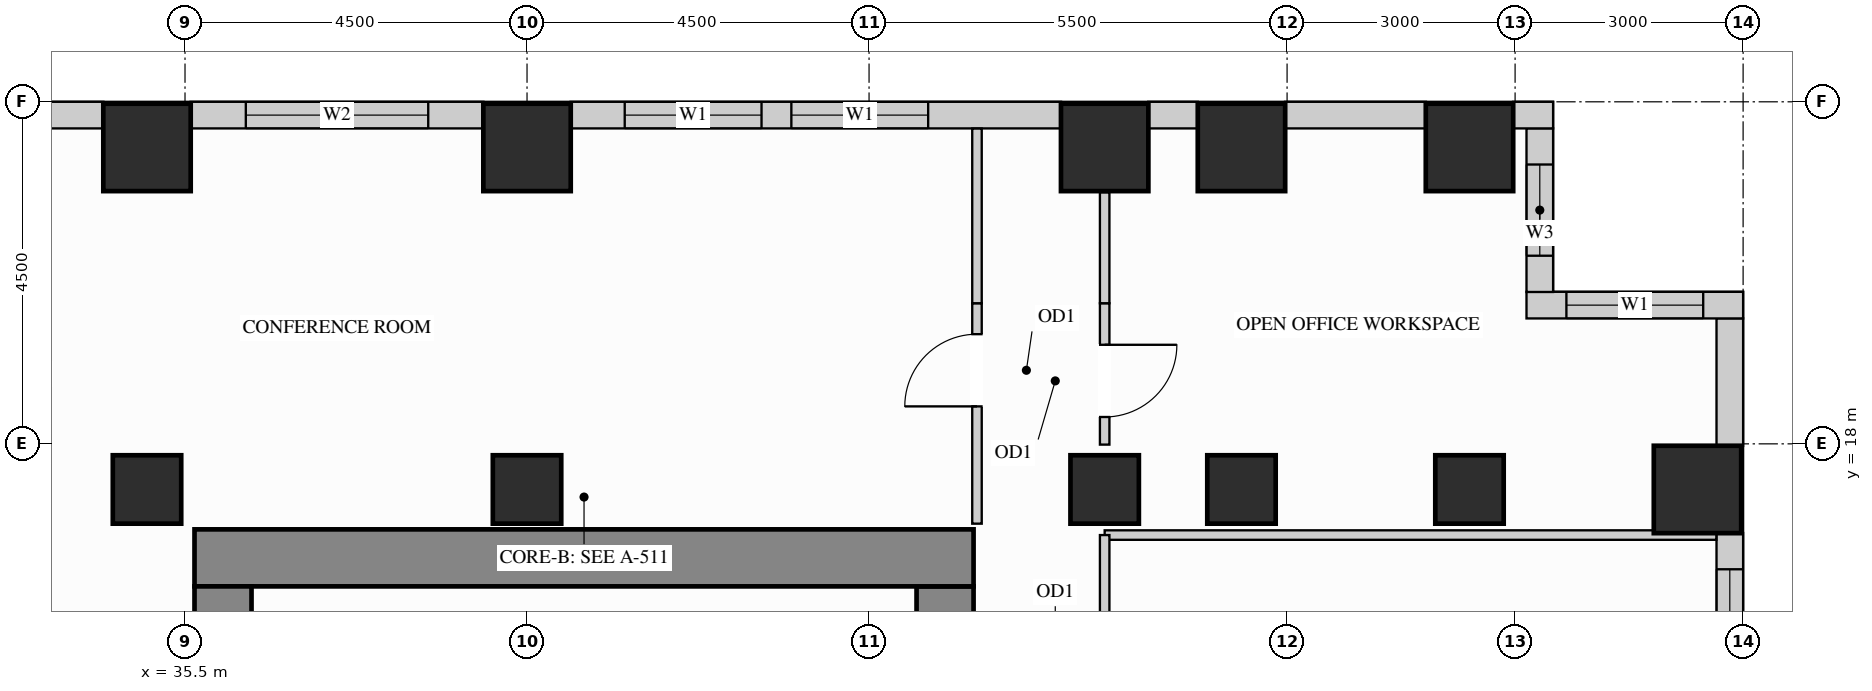
"""IFC4 building model, lengths in metres.
Left out: names, types, materials, properties, quantities, classifications, styles, units other than length and angle.
Written with IfcOpenShell. Run it as: python <this file> out.ifc"""

import sys

from ifc_helpers import new_model, si_unit, direction, frame, frame_2d, origin, origin_2d, place, context, subcontext, project, spatial, rectangle, extrude, source, transform, mapped, element, fill, save


model = new_model("IFC4")
c1 = context("Model", 3, precision=1e-05, world=origin(), true_north=direction((0.0, 1.0)))
c2 = subcontext(c1, "Body", "Model", "MODEL_VIEW")
j1 = project(units=[si_unit("LENGTHUNIT", "METRE"), si_unit("PLANEANGLEUNIT", "RADIAN")], contexts=[c1])
p1 = place(None, origin())
s1 = spatial("IfcSite", under=j1, at=p1, CompositionType="ELEMENT")
p2 = place(p1, origin())
s2 = spatial("IfcBuilding", under=s1, at=p2, CompositionType="ELEMENT")
p3 = place(p2, frame((0.0, 0.0, 81.0)))
s3 = spatial("IfcBuildingStorey", under=s2, at=p3, CompositionType="ELEMENT", Elevation=81.0)
m1 = source(origin(), c2, "Body", "SweptSolid", [
    extrude(rectangle(XDim=0.9, YDim=0.9, at=origin_2d()), origin(), (0.0, 0.0, 1.0), 3.38),
])
for number, where, z_axis, x_axis in (
    (1, (35.0, 17.4, 0.0), (0.0, 0.0, 1.0), (1.0, 0.0, 0.0)),
    (2, (40.0, 17.4, 0.0), (0.0, 0.0, 1.0), (1.0, 0.0, 0.0)),
    (3, (47.6, 17.4, 0.0), (0.0, 0.0, 1.0), (1.0, 0.0, 0.0)),
    (4, (49.4, 17.4, 0.0), (0.0, 0.0, 1.0), (1.0, 0.0, 0.0)),
    (5, (52.4, 17.4, 0.0), (0.0, 0.0, 1.0), (1.0, 0.0, 0.0)),
):
    element("IfcColumn", number, at=place(p3, frame(where, z_axis=z_axis, x_axis=x_axis)), inside=s3, PredefinedType="COLUMN", context=c2, shape_type="MappedRepresentation", body=[
        mapped(m1, transform((0.0, 0.0, 0.0), x_axis=(1.0, 0.0, 0.0), y_axis=(0.0, 1.0, 0.0), z_axis=(0.0, 0.0, 1.0))),
    ])
m2 = source(origin(), c2, "Body", "SweptSolid", [
    extrude(rectangle(XDim=1.15, YDim=1.15, at=origin_2d()), origin(), (0.0, 0.0, 1.0), 3.38),
])
for number, where, z_axis, x_axis in (
    (6, (35.0, 21.9, 0.0), (0.0, 0.0, 1.0), (1.0, 0.0, 0.0)),
    (7, (40.0, 21.9, 0.0), (0.0, 0.0, 1.0), (1.0, 0.0, 0.0)),
    (8, (47.6, 21.9, 0.0), (0.0, 0.0, 1.0), (1.0, 0.0, 0.0)),
    (9, (49.4, 21.9, 0.0), (0.0, 0.0, 1.0), (1.0, 0.0, 0.0)),
    (10, (52.4, 21.9, 0.0), (0.0, 0.0, 1.0), (1.0, 0.0, 0.0)),
    (11, (55.4, 17.4, 0.0), (0.0, 0.0, 1.0), (1.0, 0.0, 0.0)),
):
    element("IfcColumn", number, at=place(p3, frame(where, z_axis=z_axis, x_axis=x_axis)), inside=s3, PredefinedType="COLUMN", context=c2, shape_type="MappedRepresentation", body=[
        mapped(m2, transform((0.0, 0.0, 0.0), x_axis=(1.0, 0.0, 0.0), y_axis=(0.0, 1.0, 0.0), z_axis=(0.0, 0.0, 1.0))),
    ])
m3 = source(origin(), c2, "Body", "SweptSolid", [
    extrude(rectangle(XDim=3.725, YDim=0.75, at=frame_2d((1.863, 0.0))), origin(), (0.0, 0.0, 1.0), 3.38),
])
p4 = place(p3, frame((45.5, 12.4, 0.0), z_axis=(0.0, 0.0, 1.0), x_axis=(0.0, 1.0, 0.0)))
e12 = element("IfcWall", 12, at=p4, inside=s3, PredefinedType="SHEAR", context=c2, shape_type="MappedRepresentation", body=[
    mapped(m3, transform((0.0, 0.0, 0.0), x_axis=(1.0, 0.0, 0.0), y_axis=(0.0, 1.0, 0.0), z_axis=(0.0, 0.0, 1.0))),
])
m4 = source(origin(), c2, "Body", "SweptSolid", [
    extrude(rectangle(XDim=10.25, YDim=0.75, at=frame_2d((5.125, 0.0))), origin(), (0.0, 0.0, 1.0), 3.38),
])
p5 = place(p3, frame((35.625, 16.5, 0.0), z_axis=(0.0, 0.0, 1.0), x_axis=(1.0, 0.0, 0.0)))
e13 = element("IfcWall", 13, at=p5, inside=s3, PredefinedType="SHEAR", context=c2, shape_type="MappedRepresentation", body=[
    mapped(m4, transform((0.0, 0.0, 0.0), x_axis=(1.0, 0.0, 0.0), y_axis=(0.0, 1.0, 0.0), z_axis=(0.0, 0.0, 1.0))),
])
p6 = place(p3, frame((36.0, 12.4, 0.0), z_axis=(0.0, 0.0, 1.0), x_axis=(0.0, 1.0, 0.0)))
e14 = element("IfcWall", 14, at=p6, inside=s3, PredefinedType="SHEAR", context=c2, shape_type="MappedRepresentation", body=[
    mapped(m3, transform((0.0, 0.0, 0.0), x_axis=(1.0, 0.0, 0.0), y_axis=(0.0, 1.0, 0.0), z_axis=(0.0, 0.0, 1.0))),
])
p7 = place(p3, frame((55.825, 14.073, 0.0), z_axis=(0.0, 0.0, 1.0), x_axis=(0.0, 1.0, 0.0)))
e15 = element("IfcWall", 15, at=p7, inside=s3, PredefinedType="SOLIDWALL", context=c2, shape_type="SweptSolid", body=[
    extrude(rectangle(XDim=2.754, YDim=0.35, at=frame_2d((1.377, 0.0))), origin(), (0.0, 0.0, 1.0), 3.365),
])
p8 = place(p7, frame((0.477, 0.0, 0.78)))
e16 = element("IfcOpeningElement", 16, at=p8, cuts=e15, PredefinedType="OPENING", context=c2, shape_type="SweptSolid", body=[
    extrude(rectangle(XDim=1.8, YDim=2.1, at=frame_2d((0.9, 1.05))), frame((0.0, 0.185, 0.0), z_axis=(0.0, -1.0, 0.0), x_axis=(1.0, 0.0, 0.0)), (0.0, 0.0, 1.0), 0.37),
])
m5 = source(origin(), c2, "Body", "SweptSolid", [
    extrude(rectangle(XDim=1.679, YDim=0.35, at=frame_2d((0.84, 0.0))), origin(), (0.0, 0.0, 1.0), 3.365),
])
p9 = place(p3, frame((55.825, 17.973, 0.0), z_axis=(0.0, 0.0, 1.0), x_axis=(0.0, 1.0, 0.0)))
e17 = element("IfcWall", 17, at=p9, inside=s3, PredefinedType="SOLIDWALL", context=c2, shape_type="MappedRepresentation", body=[
    mapped(m5, transform((0.0, 0.0, 0.0), x_axis=(1.0, 0.0, 0.0), y_axis=(0.0, 1.0, 0.0), z_axis=(0.0, 0.0, 1.0))),
])
p10 = place(p3, frame((56.0, 19.825, 0.0), z_axis=(0.0, 0.0, 1.0), x_axis=(-1.0, 0.0, 0.0)))
e18 = element("IfcWall", 18, at=p10, inside=s3, PredefinedType="SOLIDWALL", context=c2, shape_type="SweptSolid", body=[
    extrude(rectangle(XDim=2.85, YDim=0.35, at=frame_2d((1.425, 0.0))), origin(), (0.0, 0.0, 1.0), 3.365),
])
p11 = place(p10, frame((0.525, 0.0, 0.78)))
e19 = element("IfcOpeningElement", 19, at=p11, cuts=e18, PredefinedType="OPENING", context=c2, shape_type="SweptSolid", body=[
    extrude(rectangle(XDim=1.8, YDim=2.1, at=frame_2d((0.9, 1.05))), frame((0.0, 0.185, 0.0), z_axis=(0.0, -1.0, 0.0), x_axis=(1.0, 0.0, 0.0)), (0.0, 0.0, 1.0), 0.37),
])
p12 = place(p3, frame((53.325, 19.998, 0.0), z_axis=(0.0, 0.0, 1.0), x_axis=(0.0, 1.0, 0.0)))
e20 = element("IfcWall", 20, at=p12, inside=s3, PredefinedType="SOLIDWALL", context=c2, shape_type="SweptSolid", body=[
    extrude(rectangle(XDim=2.154, YDim=0.35, at=frame_2d((1.077, 0.0))), origin(), (0.0, 0.0, 1.0), 3.365),
])
p13 = place(p12, frame((0.477, 0.0, 0.78)))
e21 = element("IfcOpeningElement", 21, at=p13, cuts=e20, PredefinedType="OPENING", context=c2, shape_type="SweptSolid", body=[
    extrude(rectangle(XDim=1.2, YDim=2.1, at=frame_2d((0.6, 1.05))), frame((0.0, 0.185, 0.0), z_axis=(0.0, -1.0, 0.0), x_axis=(1.0, 0.0, 0.0)), (0.0, 0.0, 1.0), 0.37),
])
m6 = source(origin(), c2, "Body", "SweptSolid", [
    extrude(rectangle(XDim=0.527, YDim=0.35, at=frame_2d((0.264, 0.0))), origin(), (0.0, 0.0, 1.0), 3.365),
])
p14 = place(p3, frame((53.5, 22.325, 0.0), z_axis=(0.0, 0.0, 1.0), x_axis=(-1.0, 0.0, 0.0)))
e22 = element("IfcWall", 22, at=p14, inside=s3, PredefinedType="SOLIDWALL", context=c2, shape_type="MappedRepresentation", body=[
    mapped(m6, transform((0.0, 0.0, 0.0), x_axis=(1.0, 0.0, 0.0), y_axis=(0.0, 1.0, 0.0), z_axis=(0.0, 0.0, 1.0))),
])
m7 = source(origin(), c2, "Body", "SweptSolid", [
    extrude(rectangle(XDim=1.854, YDim=0.35, at=frame_2d((0.927, 0.0))), origin(), (0.0, 0.0, 1.0), 3.365),
])
p15 = place(p3, frame((51.827, 22.325, 0.0), z_axis=(0.0, 0.0, 1.0), x_axis=(-1.0, 0.0, 0.0)))
e23 = element("IfcWall", 23, at=p15, inside=s3, PredefinedType="SOLIDWALL", context=c2, shape_type="MappedRepresentation", body=[
    mapped(m7, transform((0.0, 0.0, 0.0), x_axis=(1.0, 0.0, 0.0), y_axis=(0.0, 1.0, 0.0), z_axis=(0.0, 0.0, 1.0))),
])
m8 = source(origin(), c2, "Body", "SweptSolid", [
    extrude(rectangle(XDim=0.654, YDim=0.35, at=frame_2d((0.327, 0.0))), origin(), (0.0, 0.0, 1.0), 3.365),
])
p16 = place(p3, frame((48.827, 22.325, 0.0), z_axis=(0.0, 0.0, 1.0), x_axis=(-1.0, 0.0, 0.0)))
e24 = element("IfcWall", 24, at=p16, inside=s3, PredefinedType="SOLIDWALL", context=c2, shape_type="MappedRepresentation", body=[
    mapped(m8, transform((0.0, 0.0, 0.0), x_axis=(1.0, 0.0, 0.0), y_axis=(0.0, 1.0, 0.0), z_axis=(0.0, 0.0, 1.0))),
])
p17 = place(p3, frame((47.027, 22.325, 0.0), z_axis=(0.0, 0.0, 1.0), x_axis=(-1.0, 0.0, 0.0)))
e25 = element("IfcWall", 25, at=p17, inside=s3, PredefinedType="SOLIDWALL", context=c2, shape_type="SweptSolid", body=[
    extrude(rectangle(XDim=6.454, YDim=0.35, at=frame_2d((3.227, 0.0))), origin(), (0.0, 0.0, 1.0), 3.365),
])
p18 = place(p17, frame((1.749, 0.0, 0.78)))
e26 = element("IfcOpeningElement", 26, at=p18, cuts=e25, PredefinedType="OPENING", context=c2, shape_type="SweptSolid", body=[
    extrude(rectangle(XDim=1.8, YDim=2.1, at=frame_2d((0.9, 1.05))), frame((0.0, 0.185, 0.0), z_axis=(0.0, -1.0, 0.0), x_axis=(1.0, 0.0, 0.0)), (0.0, 0.0, 1.0), 0.37),
])
p19 = place(p17, frame((3.942, 0.0, 0.78)))
e27 = element("IfcOpeningElement", 27, at=p19, cuts=e25, PredefinedType="OPENING", context=c2, shape_type="SweptSolid", body=[
    extrude(rectangle(XDim=1.8, YDim=2.1, at=frame_2d((0.9, 1.05))), frame((0.0, 0.185, 0.0), z_axis=(0.0, -1.0, 0.0), x_axis=(1.0, 0.0, 0.0)), (0.0, 0.0, 1.0), 0.37),
])
p20 = place(p3, frame((39.427, 22.325, 0.0), z_axis=(0.0, 0.0, 1.0), x_axis=(-1.0, 0.0, 0.0)))
e28 = element("IfcWall", 28, at=p20, inside=s3, PredefinedType="SOLIDWALL", context=c2, shape_type="SweptSolid", body=[
    extrude(rectangle(XDim=3.854, YDim=0.35, at=frame_2d((1.927, 0.0))), origin(), (0.0, 0.0, 1.0), 3.365),
])
p21 = place(p20, frame((0.727, 0.0, 0.78)))
e29 = element("IfcOpeningElement", 29, at=p21, cuts=e28, PredefinedType="OPENING", context=c2, shape_type="SweptSolid", body=[
    extrude(rectangle(XDim=2.4, YDim=2.1, at=frame_2d((1.2, 1.05))), frame((0.0, 0.185, 0.0), z_axis=(0.0, -1.0, 0.0), x_axis=(1.0, 0.0, 0.0)), (0.0, 0.0, 1.0), 0.37),
])
p22 = place(p3, frame((34.427, 22.325, 0.0), z_axis=(0.0, 0.0, 1.0), x_axis=(-1.0, 0.0, 0.0)))
e30 = element("IfcWall", 30, at=p22, inside=s3, PredefinedType="SOLIDWALL", context=c2, shape_type="SweptSolid", body=[
    extrude(rectangle(XDim=14.979, YDim=0.35, at=frame_2d((7.49, 0.0))), origin(), (0.0, 0.0, 1.0), 3.365),
])
p23 = place(p22, frame((4.1, 0.0, 0.78)))
e31 = element("IfcOpeningElement", 31, at=p23, cuts=e30, PredefinedType="OPENING", context=c2, shape_type="SweptSolid", body=[
    extrude(rectangle(XDim=1.5, YDim=2.0, at=frame_2d((0.75, 1.0))), frame((0.0, 0.185, 0.0), z_axis=(0.0, -1.0, 0.0), x_axis=(1.0, 0.0, 0.0)), (0.0, 0.0, 1.0), 0.37),
])
p24 = place(p22, frame((9.379, 0.0, 0.78)))
e32 = element("IfcOpeningElement", 32, at=p24, cuts=e30, PredefinedType="OPENING", context=c2, shape_type="SweptSolid", body=[
    extrude(rectangle(XDim=1.5, YDim=2.0, at=frame_2d((0.75, 1.0))), frame((0.0, 0.185, 0.0), z_axis=(0.0, -1.0, 0.0), x_axis=(1.0, 0.0, 0.0)), (0.0, 0.0, 1.0), 0.37),
])
m9 = source(origin(), c2, "Body", "SweptSolid", [
    extrude(rectangle(XDim=8.048, YDim=0.125, at=frame_2d((4.024, 0.0))), origin(), (0.0, 0.0, 1.0), 3.365),
])
p25 = place(p3, frame((47.6, 16.8, 0.0), z_axis=(0.0, 0.0, 1.0), x_axis=(1.0, 0.0, 0.0)))
e33 = element("IfcWall", 33, at=p25, inside=s3, PredefinedType="PARTITIONING", context=c2, shape_type="MappedRepresentation", body=[
    mapped(m9, transform((0.0, 0.0, 0.0), x_axis=(1.0, 0.0, 0.0), y_axis=(0.0, 1.0, 0.0), z_axis=(0.0, 0.0, 1.0))),
])
p26 = place(p3, frame((47.6, 14.09, 0.0), z_axis=(0.0, 0.0, 1.0), x_axis=(0.0, 1.0, 0.0)))
e34 = element("IfcWall", 34, at=p26, inside=s3, PredefinedType="PARTITIONING", context=c2, shape_type="SweptSolid", body=[
    extrude(rectangle(XDim=2.71, YDim=0.125, at=frame_2d((1.355, 0.0))), origin(), (0.0, 0.0, 1.0), 2.677),
])
p27 = place(p26, frame((0.38, 0.0, 0.0)))
e35 = element("IfcOpeningElement", 35, at=p27, cuts=e34, PredefinedType="OPENING", context=c2, shape_type="SweptSolid", body=[
    extrude(rectangle(XDim=0.95, YDim=2.15, at=frame_2d((0.475, 1.075))), frame((0.0, 0.073, 0.0), z_axis=(0.0, -1.0, 0.0), x_axis=(1.0, 0.0, 0.0)), (0.0, 0.0, 1.0), 0.145),
])
p28 = place(p3, frame((47.6, 17.99, 0.0), z_axis=(0.0, 0.0, 1.0), x_axis=(0.0, 1.0, 0.0)))
e36 = element("IfcWall", 36, at=p28, inside=s3, PredefinedType="PARTITIONING", context=c2, shape_type="SweptSolid", body=[
    extrude(rectangle(XDim=1.86, YDim=0.125, at=frame_2d((0.93, 0.0))), origin(), (0.0, 0.0, 1.0), 2.677),
])
p29 = place(p28, frame((0.363, 0.0, 0.0)))
e37 = element("IfcOpeningElement", 37, at=p29, cuts=e36, PredefinedType="OPENING", context=c2, shape_type="SweptSolid", body=[
    extrude(rectangle(XDim=0.95, YDim=2.15, at=frame_2d((0.475, 1.075))), frame((0.0, 0.073, 0.0), z_axis=(0.0, -1.0, 0.0), x_axis=(1.0, 0.0, 0.0)), (0.0, 0.0, 1.0), 0.145),
])
m10 = source(origin(), c2, "Body", "SweptSolid", [
    extrude(rectangle(XDim=1.46, YDim=0.125, at=frame_2d((0.73, 0.0))), origin(), (0.0, 0.0, 1.0), 2.677),
])
p30 = place(p3, frame((47.6, 19.85, 0.0), z_axis=(0.0, 0.0, 1.0), x_axis=(0.0, 1.0, 0.0)))
e38 = element("IfcWall", 38, at=p30, inside=s3, PredefinedType="PARTITIONING", context=c2, shape_type="MappedRepresentation", body=[
    mapped(m10, transform((0.0, 0.0, 0.0), x_axis=(1.0, 0.0, 0.0), y_axis=(0.0, 1.0, 0.0), z_axis=(0.0, 0.0, 1.0))),
])
p31 = place(p3, frame((45.92, 16.95, 0.0), z_axis=(0.0, 0.0, 1.0), x_axis=(0.0, 1.0, 0.0)))
e39 = element("IfcWall", 39, at=p31, inside=s3, PredefinedType="PARTITIONING", context=c2, shape_type="SweptSolid", body=[
    extrude(rectangle(XDim=2.9, YDim=0.125, at=frame_2d((1.45, 0.0))), origin(), (0.0, 0.0, 1.0), 3.365),
])
p32 = place(p31, frame((1.543, 0.0, 0.0)))
e40 = element("IfcOpeningElement", 40, at=p32, cuts=e39, PredefinedType="OPENING", context=c2, shape_type="SweptSolid", body=[
    extrude(rectangle(XDim=0.95, YDim=2.15, at=frame_2d((0.475, 1.075))), frame((0.0, 0.073, 0.0), z_axis=(0.0, -1.0, 0.0), x_axis=(1.0, 0.0, 0.0)), (0.0, 0.0, 1.0), 0.145),
])
m11 = source(origin(), c2, "Body", "SweptSolid", [
    extrude(rectangle(XDim=2.298, YDim=0.125, at=frame_2d((1.149, 0.0))), origin(), (0.0, 0.0, 1.0), 3.365),
])
p33 = place(p3, frame((45.92, 19.85, 0.0), z_axis=(0.0, 0.0, 1.0), x_axis=(0.0, 1.0, 0.0)))
e41 = element("IfcWall", 41, at=p33, inside=s3, PredefinedType="PARTITIONING", context=c2, shape_type="MappedRepresentation", body=[
    mapped(m11, transform((0.0, 0.0, 0.0), x_axis=(1.0, 0.0, 0.0), y_axis=(0.0, 1.0, 0.0), z_axis=(0.0, 0.0, 1.0))),
])
m12 = source(origin(), c2, "Body", "SweptSolid", [
    extrude(rectangle(XDim=0.95, YDim=2.15, at=frame_2d((0.475, 1.075))), frame((0.0, 0.025, 0.0), z_axis=(0.0, -1.0, 0.0), x_axis=(1.0, 0.0, 0.0)), (0.0, 0.0, 1.0), 0.05),
])
p34 = place(p32, origin())
e42 = element("IfcDoor", 42, at=p34, inside=s3, OperationType="SINGLE_SWING_LEFT", PredefinedType="DOOR", context=c2, shape_type="MappedRepresentation", body=[
    mapped(m12, transform((0.0, 0.0, 0.0), x_axis=(1.0, 0.0, 0.0), y_axis=(0.0, 1.0, 0.0), z_axis=(0.0, 0.0, 1.0))),
])
fill(e40, e42)
p35 = place(p29, origin())
e43 = element("IfcDoor", 43, at=p35, inside=s3, OperationType="SINGLE_SWING_RIGHT", PredefinedType="DOOR", context=c2, shape_type="MappedRepresentation", body=[
    mapped(m12, transform((0.0, 0.0, 0.0), x_axis=(1.0, 0.0, 0.0), y_axis=(0.0, 1.0, 0.0), z_axis=(0.0, 0.0, 1.0))),
])
fill(e37, e43)
m13 = source(origin(), c2, "Body", "SweptSolid", [
    extrude(rectangle(XDim=1.8, YDim=2.1, at=frame_2d((0.9, 1.05))), frame((0.0, 0.03, 0.0), z_axis=(0.0, -1.0, 0.0), x_axis=(1.0, 0.0, 0.0)), (0.0, 0.0, 1.0), 0.06),
])
p36 = place(p8, origin())
e44 = element("IfcWindow", 44, at=p36, inside=s3, PartitioningType="SINGLE_PANEL", PredefinedType="WINDOW", context=c2, shape_type="MappedRepresentation", body=[
    mapped(m13, transform((0.0, 0.0, 0.0), x_axis=(1.0, 0.0, 0.0), y_axis=(0.0, 1.0, 0.0), z_axis=(0.0, 0.0, 1.0))),
])
fill(e16, e44)
p37 = place(p11, origin())
e45 = element("IfcWindow", 45, at=p37, inside=s3, PartitioningType="SINGLE_PANEL", PredefinedType="WINDOW", context=c2, shape_type="MappedRepresentation", body=[
    mapped(m13, transform((0.0, 0.0, 0.0), x_axis=(1.0, 0.0, 0.0), y_axis=(0.0, 1.0, 0.0), z_axis=(0.0, 0.0, 1.0))),
])
fill(e19, e45)
p38 = place(p18, origin())
e46 = element("IfcWindow", 46, at=p38, inside=s3, PartitioningType="SINGLE_PANEL", PredefinedType="WINDOW", context=c2, shape_type="MappedRepresentation", body=[
    mapped(m13, transform((0.0, 0.0, 0.0), x_axis=(1.0, 0.0, 0.0), y_axis=(0.0, 1.0, 0.0), z_axis=(0.0, 0.0, 1.0))),
])
fill(e26, e46)
p39 = place(p19, origin())
e47 = element("IfcWindow", 47, at=p39, inside=s3, PartitioningType="SINGLE_PANEL", PredefinedType="WINDOW", context=c2, shape_type="MappedRepresentation", body=[
    mapped(m13, transform((0.0, 0.0, 0.0), x_axis=(1.0, 0.0, 0.0), y_axis=(0.0, 1.0, 0.0), z_axis=(0.0, 0.0, 1.0))),
])
fill(e27, e47)
m14 = source(origin(), c2, "Body", "SweptSolid", [
    extrude(rectangle(XDim=2.4, YDim=2.1, at=frame_2d((1.2, 1.05))), frame((0.0, 0.03, 0.0), z_axis=(0.0, -1.0, 0.0), x_axis=(1.0, 0.0, 0.0)), (0.0, 0.0, 1.0), 0.06),
])
p40 = place(p21, origin())
e48 = element("IfcWindow", 48, at=p40, inside=s3, PartitioningType="SINGLE_PANEL", PredefinedType="WINDOW", context=c2, shape_type="MappedRepresentation", body=[
    mapped(m14, transform((0.0, 0.0, 0.0), x_axis=(1.0, 0.0, 0.0), y_axis=(0.0, 1.0, 0.0), z_axis=(0.0, 0.0, 1.0))),
])
fill(e29, e48)
m15 = source(origin(), c2, "Body", "SweptSolid", [
    extrude(rectangle(XDim=1.2, YDim=2.1, at=frame_2d((0.6, 1.05))), frame((0.0, 0.03, 0.0), z_axis=(0.0, -1.0, 0.0), x_axis=(1.0, 0.0, 0.0)), (0.0, 0.0, 1.0), 0.06),
])
p41 = place(p13, origin())
e49 = element("IfcWindow", 49, at=p41, inside=s3, PartitioningType="SINGLE_PANEL", PredefinedType="WINDOW", context=c2, shape_type="MappedRepresentation", body=[
    mapped(m15, transform((0.0, 0.0, 0.0), x_axis=(1.0, 0.0, 0.0), y_axis=(0.0, 1.0, 0.0), z_axis=(0.0, 0.0, 1.0))),
])
fill(e21, e49)
save(model, sys.argv[1])
